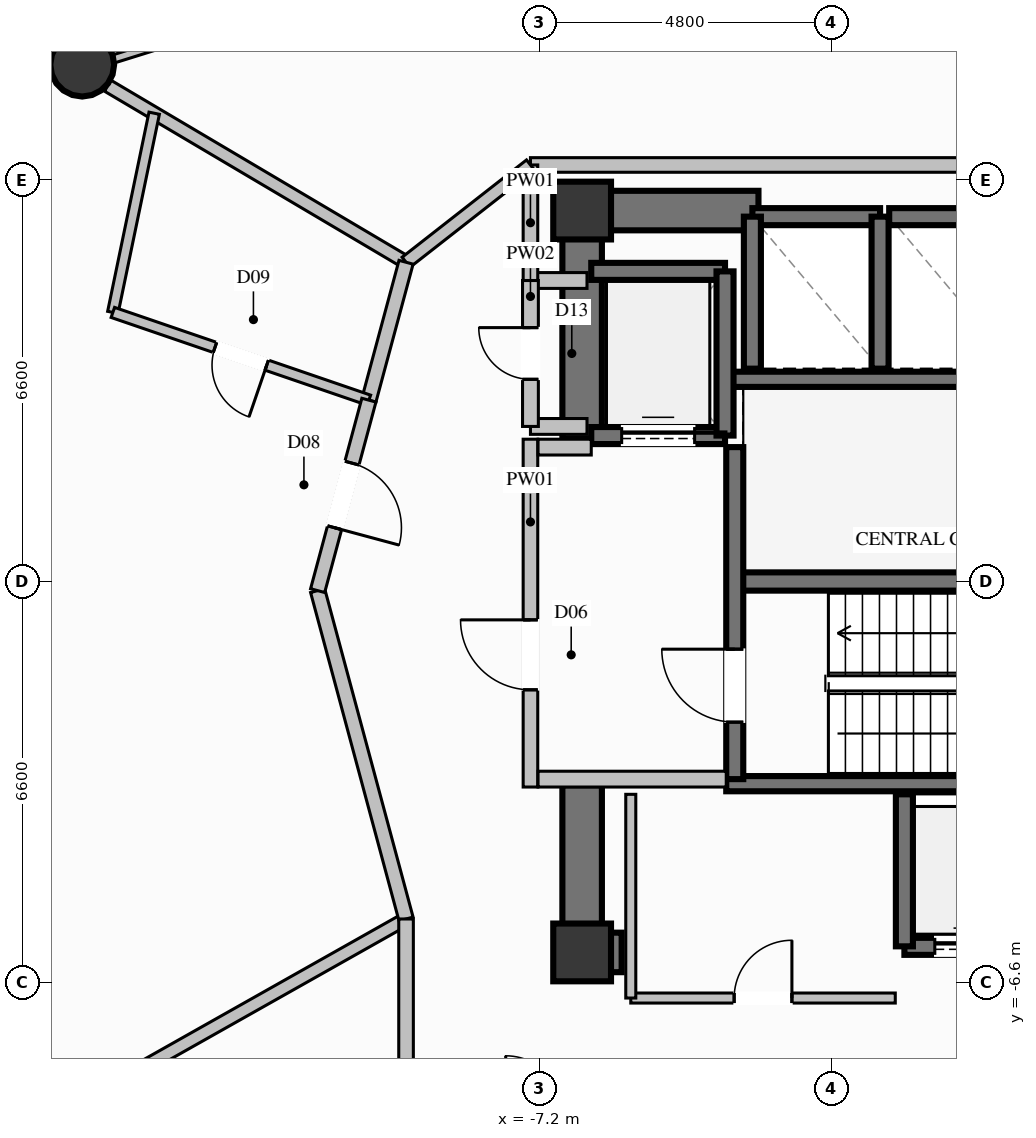
"""IFC4 building model, lengths in metres.
Left out: names, types, materials, properties, quantities, classifications, styles, units other than length and angle.
Written with IfcOpenShell. Run it as: python <this file> out.ifc"""

import sys

from ifc_helpers import new_model, si_unit, direction, frame, frame_2d, origin, origin_2d, place, context, subcontext, project, spatial, rectangle, circle, extrude, element, fill, save


model = new_model("IFC4")
c1 = context("Model", 3, precision=1e-05, world=origin(), true_north=direction((0.0, 1.0)))
c2 = subcontext(c1, "Body", "Model", "MODEL_VIEW")
j1 = project(units=[si_unit("LENGTHUNIT", "METRE"), si_unit("PLANEANGLEUNIT", "RADIAN")], contexts=[c1])
p1 = place(None, origin())
s1 = spatial("IfcSite", under=j1, at=p1, CompositionType="ELEMENT")
p2 = place(p1, origin())
s2 = spatial("IfcBuilding", under=s1, at=p2, CompositionType="ELEMENT")
p3 = place(p2, frame((0.0, 0.0, 120.6)))
s3 = spatial("IfcBuildingStorey", under=s2, at=p3, CompositionType="ELEMENT", Elevation=120.6)
for number, where, z_axis, x_axis in (
    (1, (-6.5, -6.1, 0.0), (0.0, 0.0, 1.0), (1.0, 0.0, 0.0)),
    (2, (-6.5, 6.1, 0.0), (0.0, 0.0, 1.0), (1.0, 0.0, 0.0)),
):
    element("IfcColumn", number, at=place(p3, frame(where, z_axis=z_axis, x_axis=x_axis)), inside=s3, PredefinedType="COLUMN", context=c2, shape_type="SweptSolid", body=[
        extrude(rectangle(XDim=0.95, YDim=0.95, at=origin_2d()), origin(), (0.0, 0.0, 1.0), 3.6),
    ])
p4 = place(p3, frame((-3.99, 0.0, 0.0), z_axis=(0.0, 0.0, 1.0), x_axis=(1.0, 0.0, 0.0)))
e3 = element("IfcWall", 3, at=p4, inside=s3, PredefinedType="SHEAR", context=c2, shape_type="SweptSolid", body=[
    extrude(rectangle(XDim=7.98, YDim=0.3, at=frame_2d((3.99, 0.0))), origin(), (0.0, 0.0, 1.0), 3.6),
])
for number, where, z_axis, x_axis in (
    (4, (-4.13, -3.325, 0.0), (0.0, 0.0, 1.0), (1.0, 0.0, 0.0)),
    (5, (-4.13, 3.325, 0.0), (0.0, 0.0, 1.0), (1.0, 0.0, 0.0)),
):
    element("IfcWall", number, at=place(p3, frame(where, z_axis=z_axis, x_axis=x_axis)), inside=s3, PredefinedType="SOLIDWALL", context=c2, shape_type="SweptSolid", body=[
        extrude(rectangle(XDim=8.26, YDim=0.25, at=frame_2d((4.13, 0.0))), origin(), (0.0, 0.0, 1.0), 3.6),
    ])
p5 = place(p3, frame((-6.175, -6.1, 0.0), z_axis=(0.0, 0.0, 1.0), x_axis=(1.0, 0.0, 0.0)))
e6 = element("IfcWall", 6, at=p5, inside=s3, PredefinedType="SHEAR", context=c2, shape_type="SweptSolid", body=[
    extrude(rectangle(XDim=0.325, YDim=0.65, at=frame_2d((0.163, 0.0))), origin(), (0.0, 0.0, 1.0), 3.6),
])
p6 = place(p3, frame((-6.175, 6.1, 0.0), z_axis=(0.0, 0.0, 1.0), x_axis=(1.0, 0.0, 0.0)))
e7 = element("IfcWall", 7, at=p6, inside=s3, PredefinedType="SHEAR", context=c2, shape_type="SweptSolid", body=[
    extrude(rectangle(XDim=2.575, YDim=0.65, at=frame_2d((1.288, 0.0))), origin(), (0.0, 0.0, 1.0), 3.6),
])
p7 = place(p3, frame((-6.5, 2.35, 0.0), z_axis=(0.0, 0.0, 1.0), x_axis=(0.0, 1.0, 0.0)))
e8 = element("IfcWall", 8, at=p7, inside=s3, PredefinedType="SHEAR", context=c2, shape_type="SweptSolid", body=[
    extrude(rectangle(XDim=4.075, YDim=0.65, at=frame_2d((2.038, 0.0))), origin(), (0.0, 0.0, 1.0), 3.6),
])
p8 = place(p3, frame((-6.5, -6.425, 0.0), z_axis=(0.0, 0.0, 1.0), x_axis=(0.0, 1.0, 0.0)))
e9 = element("IfcWall", 9, at=p8, inside=s3, PredefinedType="SHEAR", context=c2, shape_type="SweptSolid", body=[
    extrude(rectangle(XDim=3.075, YDim=0.65, at=frame_2d((1.538, 0.0))), origin(), (0.0, 0.0, 1.0), 3.6),
])
p9 = place(p3, frame((-14.722, 8.5, 0.0), z_axis=(0.0, 0.0, 1.0), x_axis=(1.0, 0.0, 0.0)))
e10 = element("IfcColumn", 10, at=p9, inside=s3, PredefinedType="COLUMN", context=c2, shape_type="SweptSolid", body=[
    extrude(circle(Radius=0.525, at=origin_2d()), origin(), (0.0, 0.0, 1.0), 3.6),
])
p10 = place(p3, frame((-1.2, -6.0, 0.0), z_axis=(0.0, 0.0, 1.0), x_axis=(1.0, 0.0, 0.0)))
e11 = element("IfcWall", 11, at=p10, inside=s3, PredefinedType="SOLIDWALL", context=c2, shape_type="SweptSolid", body=[
    extrude(rectangle(XDim=2.1, YDim=0.28, at=frame_2d((1.05, 0.0))), origin(), (0.0, 0.0, 1.0), 3.35),
])
p11 = place(p10, frame((0.5, 0.0, 0.0)))
e12 = element("IfcOpeningElement", 12, at=p11, cuts=e11, PredefinedType="OPENING", context=c2, shape_type="SweptSolid", body=[
    extrude(rectangle(XDim=1.1, YDim=2.2, at=frame_2d((0.55, 1.1))), frame((0.0, 0.15, 0.0), z_axis=(0.0, -1.0, 0.0), x_axis=(1.0, 0.0, 0.0)), (0.0, 0.0, 1.0), 0.3),
])
p12 = place(p3, frame((-1.2, -3.5, 0.0), z_axis=(0.0, 0.0, 1.0), x_axis=(0.0, -1.0, 0.0)))
e13 = element("IfcWall", 13, at=p12, inside=s3, PredefinedType="SOLIDWALL", context=c2, shape_type="SweptSolid", body=[
    extrude(rectangle(XDim=2.5, YDim=0.28, at=frame_2d((1.25, 0.0))), origin(), (0.0, 0.0, 1.0), 3.35),
])
p13 = place(p3, frame((-1.6, 6.0, 0.0), z_axis=(0.0, 0.0, 1.0), x_axis=(-1.0, 0.0, 0.0)))
e14 = element("IfcWall", 14, at=p13, inside=s3, PredefinedType="SOLIDWALL", context=c2, shape_type="SweptSolid", body=[
    extrude(rectangle(XDim=2.1, YDim=0.28, at=frame_2d((1.05, 0.0))), origin(), (0.0, 0.0, 1.0), 3.35),
])
for number, where, z_axis, x_axis in (
    (15, (-3.7, 6.0, 0.0), (0.0, 0.0, 1.0), (0.0, -1.0, 0.0)),
    (16, (-1.6, 3.5, 0.0), (0.0, 0.0, 1.0), (0.0, 1.0, 0.0)),
):
    element("IfcWall", number, at=place(p3, frame(where, z_axis=z_axis, x_axis=x_axis)), inside=s3, PredefinedType="SOLIDWALL", context=c2, shape_type="SweptSolid", body=[
        extrude(rectangle(XDim=2.5, YDim=0.28, at=frame_2d((1.25, 0.0))), origin(), (0.0, 0.0, 1.0), 3.35),
    ])
p14 = place(p3, frame((0.65, 6.0, 0.0), z_axis=(0.0, 0.0, 1.0), x_axis=(-1.0, 0.0, 0.0)))
e17 = element("IfcWall", 17, at=p14, inside=s3, PredefinedType="SOLIDWALL", context=c2, shape_type="SweptSolid", body=[
    extrude(rectangle(XDim=2.1, YDim=0.28, at=frame_2d((1.05, 0.0))), origin(), (0.0, 0.0, 1.0), 3.35),
])
p15 = place(p3, frame((-6.35, 2.4, 0.0), z_axis=(0.0, 0.0, 1.0), x_axis=(1.0, 0.0, 0.0)))
e18 = element("IfcWall", 18, at=p15, inside=s3, PredefinedType="SOLIDWALL", context=c2, shape_type="SweptSolid", body=[
    extrude(rectangle(XDim=2.2, YDim=0.28, at=frame_2d((1.1, 0.0))), origin(), (0.0, 0.0, 1.0), 3.35),
])
p16 = place(p15, frame((0.5, 0.0, 0.0)))
e19 = element("IfcOpeningElement", 19, at=p16, cuts=e18, PredefinedType="OPENING", context=c2, shape_type="SweptSolid", body=[
    extrude(rectangle(XDim=1.2, YDim=2.2, at=frame_2d((0.6, 1.1))), frame((0.0, 0.15, 0.0), z_axis=(0.0, -1.0, 0.0), x_axis=(1.0, 0.0, 0.0)), (0.0, 0.0, 1.0), 0.3),
])
p17 = place(p3, frame((-4.15, 5.1, 0.0), z_axis=(0.0, 0.0, 1.0), x_axis=(-1.0, 0.0, 0.0)))
e20 = element("IfcWall", 20, at=p17, inside=s3, PredefinedType="SOLIDWALL", context=c2, shape_type="SweptSolid", body=[
    extrude(rectangle(XDim=2.2, YDim=0.28, at=frame_2d((1.1, 0.0))), origin(), (0.0, 0.0, 1.0), 3.35),
])
p18 = place(p3, frame((-4.15, 2.4, 0.0), z_axis=(0.0, 0.0, 1.0), x_axis=(0.0, 1.0, 0.0)))
e21 = element("IfcWall", 21, at=p18, inside=s3, PredefinedType="SOLIDWALL", context=c2, shape_type="SweptSolid", body=[
    extrude(rectangle(XDim=2.7, YDim=0.28, at=frame_2d((1.35, 0.0))), origin(), (0.0, 0.0, 1.0), 3.35),
])
p19 = place(p3, frame((-3.99, -3.25, 0.0), z_axis=(0.0, 0.0, 1.0), x_axis=(0.0, 1.0, 0.0)))
e22 = element("IfcWall", 22, at=p19, inside=s3, PredefinedType="SOLIDWALL", context=c2, shape_type="SweptSolid", body=[
    extrude(rectangle(XDim=5.46, YDim=0.28, at=frame_2d((2.73, 0.0))), origin(), (0.0, 0.0, 1.0), 3.35),
])
p20 = place(p19, frame((0.937, 0.0, 0.0)))
e23 = element("IfcOpeningElement", 23, at=p20, cuts=e22, PredefinedType="OPENING", context=c2, shape_type="SweptSolid", body=[
    extrude(rectangle(XDim=1.2, YDim=2.2, at=frame_2d((0.6, 1.1))), frame((0.0, 0.15, 0.0), z_axis=(0.0, -1.0, 0.0), x_axis=(1.0, 0.0, 0.0)), (0.0, 0.0, 1.0), 0.3),
])
p21 = place(p3, frame((-7.35, -3.38, 0.0), z_axis=(0.0, 0.0, 1.0), x_axis=(0.0, 1.0, 0.0)))
e24 = element("IfcWall", 24, at=p21, inside=s3, PredefinedType="PARTITIONING", context=c2, shape_type="SweptSolid", body=[
    extrude(rectangle(XDim=5.72, YDim=0.24, at=frame_2d((2.86, 0.0))), origin(), (0.0, 0.0, 1.0), 2.435),
])
p22 = place(p21, frame((1.599, 0.0, 0.0)))
e25 = element("IfcOpeningElement", 25, at=p22, cuts=e24, PredefinedType="OPENING", context=c2, shape_type="SweptSolid", body=[
    extrude(rectangle(XDim=1.15, YDim=2.2, at=frame_2d((0.575, 1.1))), frame((0.0, 0.13, 0.0), z_axis=(0.0, -1.0, 0.0), x_axis=(1.0, 0.0, 0.0)), (0.0, 0.0, 1.0), 0.26),
])
p23 = place(p3, frame((-7.225, -3.25, 0.0), z_axis=(0.0, 0.0, 1.0), x_axis=(1.0, 0.0, 0.0)))
e26 = element("IfcWall", 26, at=p23, inside=s3, PredefinedType="PARTITIONING", context=c2, shape_type="SweptSolid", body=[
    extrude(rectangle(XDim=3.095, YDim=0.26, at=frame_2d((1.548, 0.0))), origin(), (0.0, 0.0, 1.0), 3.35),
])
p24 = place(p3, frame((-7.225, 2.21, 0.0), z_axis=(0.0, 0.0, 1.0), x_axis=(1.0, 0.0, 0.0)))
e27 = element("IfcWall", 27, at=p24, inside=s3, PredefinedType="PARTITIONING", context=c2, shape_type="SweptSolid", body=[
    extrude(rectangle(XDim=0.875, YDim=0.26, at=frame_2d((0.438, 0.0))), origin(), (0.0, 0.0, 1.0), 3.35),
])
for number, where, z_axis, x_axis in (
    (28, (-7.35, 4.95, 0.0), (0.0, 0.0, 1.0), (1.0, 0.0, 0.0)),
    (29, (-7.35, 2.55, 0.0), (0.0, 0.0, 1.0), (1.0, 0.0, 0.0)),
):
    element("IfcWall", number, at=place(p3, frame(where, z_axis=z_axis, x_axis=x_axis)), inside=s3, PredefinedType="PARTITIONING", context=c2, shape_type="SweptSolid", body=[
        extrude(rectangle(XDim=0.93, YDim=0.26, at=frame_2d((0.465, 0.0))), origin(), (0.0, 0.0, 1.0), 3.35),
    ])
p25 = place(p3, frame((-7.35, 2.55, 0.0), z_axis=(0.0, 0.0, 1.0), x_axis=(0.0, 1.0, 0.0)))
e30 = element("IfcWall", 30, at=p25, inside=s3, PredefinedType="PARTITIONING", context=c2, shape_type="SweptSolid", body=[
    extrude(rectangle(XDim=2.4, YDim=0.26, at=frame_2d((1.2, 0.0))), origin(), (0.0, 0.0, 1.0), 2.435),
])
p26 = place(p25, frame((0.775, 0.0, 0.0)))
e31 = element("IfcOpeningElement", 31, at=p26, cuts=e30, PredefinedType="OPENING", context=c2, shape_type="SweptSolid", body=[
    extrude(rectangle(XDim=0.85, YDim=2.05, at=frame_2d((0.425, 1.025))), frame((0.0, 0.14, 0.0), z_axis=(0.0, -1.0, 0.0), x_axis=(1.0, 0.0, 0.0)), (0.0, 0.0, 1.0), 0.28),
])
p27 = place(p3, frame((-7.35, 6.85, 0.0), z_axis=(0.0, 0.0, 1.0), x_axis=(1.0, 0.0, 0.0)))
e32 = element("IfcWall", 32, at=p27, inside=s3, PredefinedType="PARTITIONING", context=c2, shape_type="SweptSolid", body=[
    extrude(rectangle(XDim=14.7, YDim=0.24, at=frame_2d((7.35, 0.0))), origin(), (0.0, 0.0, 1.0), 2.435),
])
p28 = place(p3, frame((-7.35, 4.95, 0.0), z_axis=(0.0, 0.0, 1.0), x_axis=(0.0, 1.0, 0.0)))
e33 = element("IfcWall", 33, at=p28, inside=s3, PredefinedType="PARTITIONING", context=c2, shape_type="SweptSolid", body=[
    extrude(rectangle(XDim=1.9, YDim=0.24, at=frame_2d((0.95, 0.0))), origin(), (0.0, 0.0, 1.0), 2.435),
])
p29 = place(p3, frame((-5.7, -6.85, 0.0), z_axis=(0.0, 0.0, 1.0), x_axis=(1.0, 0.0, 0.0)))
e34 = element("IfcWall", 34, at=p29, inside=s3, PredefinedType="PARTITIONING", context=c2, shape_type="SweptSolid", body=[
    extrude(rectangle(XDim=4.35, YDim=0.165, at=frame_2d((2.175, 0.0))), origin(), (0.0, 0.0, 1.0), 2.435),
])
p30 = place(p29, frame((1.7, 0.0, 0.0)))
e35 = element("IfcOpeningElement", 35, at=p30, cuts=e34, PredefinedType="OPENING", context=c2, shape_type="SweptSolid", body=[
    extrude(rectangle(XDim=0.95, YDim=2.1, at=frame_2d((0.475, 1.05))), frame((0.0, 0.093, 0.0), z_axis=(0.0, -1.0, 0.0), x_axis=(1.0, 0.0, 0.0)), (0.0, 0.0, 1.0), 0.185),
])
p31 = place(p3, frame((-5.7, -3.5, 0.0), z_axis=(0.0, 0.0, 1.0), x_axis=(0.0, -1.0, 0.0)))
e36 = element("IfcWall", 36, at=p31, inside=s3, PredefinedType="PARTITIONING", context=c2, shape_type="SweptSolid", body=[
    extrude(rectangle(XDim=3.35, YDim=0.165, at=frame_2d((1.675, 0.0))), origin(), (0.0, 0.0, 1.0), 2.435),
])
p32 = place(p3, frame((-9.396, 5.25, 0.0), z_axis=(0.0, 0.0, 1.0), x_axis=(-0.860613457584, 0.509258752134, 0.0)))
e37 = element("IfcWall", 37, at=p32, inside=s3, PredefinedType="PARTITIONING", context=c2, shape_type="SweptSolid", body=[
    extrude(rectangle(XDim=5.701, YDim=0.21, at=frame_2d((2.85, 0.0))), origin(), (0.0, 0.0, 1.0), 2.719),
])
p33 = place(p3, frame((-15.228, 8.701, 0.0), z_axis=(0.0, 0.0, 1.0), x_axis=(-0.860620773238, 0.509246388962, 0.0)))
e38 = element("IfcWall", 38, at=p33, inside=s3, PredefinedType="PARTITIONING", context=c2, shape_type="SweptSolid", body=[
    extrude(rectangle(XDim=7.38, YDim=0.21, at=frame_2d((3.69, 0.0))), origin(), (0.0, 0.0, 1.0), 3.35),
])
p34 = place(p3, frame((-9.396, -5.55, 0.0), z_axis=(0.0, 0.0, 1.0), x_axis=(-0.871038847926, -0.491214133962, 0.0)))
e39 = element("IfcWall", 39, at=p34, inside=s3, PredefinedType="PARTITIONING", context=c2, shape_type="SweptSolid", body=[
    extrude(rectangle(XDim=5.545, YDim=0.21, at=frame_2d((2.772, 0.0))), origin(), (0.0, 0.0, 1.0), 2.719),
])
p35 = place(p3, frame((-9.396, 5.25, 0.0), z_axis=(0.0, 0.0, 1.0), x_axis=(0.7876993483, 0.6160598483, 0.0)))
e40 = element("IfcWall", 40, at=p35, inside=s3, PredefinedType="PARTITIONING", context=c2, shape_type="SweptSolid", body=[
    extrude(rectangle(XDim=2.597, YDim=0.21, at=frame_2d((1.299, 0.0))), origin(), (0.0, 0.0, 1.0), 3.35),
])
p36 = place(p3, frame((-14.757, 8.422, 0.0), z_axis=(0.0, 0.0, 1.0), x_axis=(0.954677897028, 0.297640912722, 0.0)))
e41 = element("IfcWall", 41, at=p36, inside=s3, PredefinedType="PARTITIONING", context=c2, shape_type="SweptSolid", body=[
    extrude(rectangle(XDim=15.458, YDim=0.135, at=frame_2d((7.729, 0.0))), origin(), (0.0, 0.0, 1.0), 2.878),
])
p37 = place(p36, frame((7.254, 0.0, 0.0)))
e42 = element("IfcOpeningElement", 42, at=p37, cuts=e41, PredefinedType="OPENING", context=c2, shape_type="SweptSolid", body=[
    extrude(rectangle(XDim=0.95, YDim=2.1, at=frame_2d((0.475, 1.05))), frame((0.0, 0.078, 0.0), z_axis=(0.0, -1.0, 0.0), x_axis=(1.0, 0.0, 0.0)), (0.0, 0.0, 1.0), 0.155),
])
p38 = place(p3, frame((-9.396, 5.25, 0.0), z_axis=(0.0, 0.0, 1.0), x_axis=(-0.260152382661, -0.965567572879, 0.0)))
e43 = element("IfcWall", 43, at=p38, inside=s3, PredefinedType="PARTITIONING", context=c2, shape_type="SweptSolid", body=[
    extrude(rectangle(XDim=2.349, YDim=0.24, at=frame_2d((1.174, 0.0))), origin(), (0.0, 0.0, 1.0), 3.35),
])
p39 = place(p3, frame((-13.538, 7.701, 0.0), z_axis=(0.0, 0.0, 1.0), x_axis=(-0.203225696563, -0.979131919741, 0.0)))
e44 = element("IfcWall", 44, at=p39, inside=s3, PredefinedType="PLUMBINGWALL", context=c2, shape_type="SweptSolid", body=[
    extrude(rectangle(XDim=3.346, YDim=0.175, at=frame_2d((1.673, 0.0))), origin(), (0.0, 0.0, 1.0), 3.35),
])
p40 = place(p3, frame((-10.007, 2.982, 0.0), z_axis=(0.0, 0.0, 1.0), x_axis=(-0.945989686211, 0.3241967205, 0.0)))
e45 = element("IfcWall", 45, at=p40, inside=s3, PredefinedType="PLUMBINGWALL", context=c2, shape_type="SweptSolid", body=[
    extrude(rectangle(XDim=4.451, YDim=0.175, at=frame_2d((2.226, 0.0))), origin(), (0.0, 0.0, 1.0), 3.35),
])
p41 = place(p40, frame((1.776, 0.0, 0.0)))
e46 = element("IfcOpeningElement", 46, at=p41, cuts=e45, PredefinedType="OPENING", context=c2, shape_type="SweptSolid", body=[
    extrude(rectangle(XDim=0.9, YDim=2.1, at=frame_2d((0.45, 1.05))), frame((0.0, 0.098, 0.0), z_axis=(0.0, -1.0, 0.0), x_axis=(1.0, 0.0, 0.0)), (0.0, 0.0, 1.0), 0.195),
])
p42 = place(p3, frame((-10.85, -0.15, 0.0), z_axis=(0.0, 0.0, 1.0), x_axis=(0.260009481157, -0.965606063417, 0.0)))
e47 = element("IfcWall", 47, at=p42, inside=s3, PredefinedType="PARTITIONING", context=c2, shape_type="SweptSolid", body=[
    extrude(rectangle(XDim=5.593, YDim=0.24, at=frame_2d((2.796, 0.0))), origin(), (0.0, 0.0, 1.0), 3.35),
])
p43 = place(p3, frame((-10.007, 2.982, 0.0), z_axis=(0.0, 0.0, 1.0), x_axis=(-0.259924881751, -0.965628839589, 0.0)))
e48 = element("IfcWall", 48, at=p43, inside=s3, PredefinedType="PARTITIONING", context=c2, shape_type="SweptSolid", body=[
    extrude(rectangle(XDim=3.243, YDim=0.24, at=frame_2d((1.622, 0.0))), origin(), (0.0, 0.0, 1.0), 3.35),
])
p44 = place(p43, frame((1.072, 0.0, 0.0)))
e49 = element("IfcOpeningElement", 49, at=p44, cuts=e48, PredefinedType="OPENING", context=c2, shape_type="SweptSolid", body=[
    extrude(rectangle(XDim=1.1, YDim=2.3, at=frame_2d((0.55, 1.15))), frame((0.0, 0.13, 0.0), z_axis=(0.0, -1.0, 0.0), x_axis=(1.0, 0.0, 0.0)), (0.0, 0.0, 1.0), 0.26),
])
p45 = place(p3, frame((-9.396, -5.55, 0.0), z_axis=(0.0, 0.0, 1.0), x_axis=(0.0, -1.0, 0.0)))
e50 = element("IfcWall", 50, at=p45, inside=s3, PredefinedType="PARTITIONING", context=c2, shape_type="SweptSolid", body=[
    extrude(rectangle(XDim=3.2, YDim=0.24, at=frame_2d((1.6, 0.0))), origin(), (0.0, 0.0, 1.0), 3.35),
])
p46 = place(p11, origin())
e51 = element("IfcDoor", 51, at=p46, inside=s3, OperationType="SLIDING_TO_LEFT", PredefinedType="DOOR", context=c2, shape_type="SweptSolid", body=[
    extrude(rectangle(XDim=1.1, YDim=2.2, at=frame_2d((0.55, 1.1))), frame((0.0, 0.025, 0.0), z_axis=(0.0, -1.0, 0.0), x_axis=(1.0, 0.0, 0.0)), (0.0, 0.0, 1.0), 0.05),
])
fill(e12, e51)
p47 = place(p16, origin())
e52 = element("IfcDoor", 52, at=p47, inside=s3, OperationType="SLIDING_TO_LEFT", PredefinedType="DOOR", context=c2, shape_type="SweptSolid", body=[
    extrude(rectangle(XDim=1.2, YDim=2.2, at=frame_2d((0.6, 1.1))), frame((0.0, 0.025, 0.0), z_axis=(0.0, -1.0, 0.0), x_axis=(1.0, 0.0, 0.0)), (0.0, 0.0, 1.0), 0.05),
])
fill(e19, e52)
p48 = place(p20, origin())
e53 = element("IfcDoor", 53, at=p48, inside=s3, OperationType="SINGLE_SWING_RIGHT", PredefinedType="DOOR", context=c2, shape_type="SweptSolid", body=[
    extrude(rectangle(XDim=1.2, YDim=2.2, at=frame_2d((0.6, 1.1))), frame((0.0, 0.025, 0.0), z_axis=(0.0, -1.0, 0.0), x_axis=(1.0, 0.0, 0.0)), (0.0, 0.0, 1.0), 0.05),
])
fill(e23, e53)
p49 = place(p22, origin())
e54 = element("IfcDoor", 54, at=p49, inside=s3, OperationType="SINGLE_SWING_RIGHT", PredefinedType="DOOR", context=c2, shape_type="SweptSolid", body=[
    extrude(rectangle(XDim=1.15, YDim=2.2, at=frame_2d((0.575, 1.1))), frame((0.0, 0.025, 0.0), z_axis=(0.0, -1.0, 0.0), x_axis=(1.0, 0.0, 0.0)), (0.0, 0.0, 1.0), 0.05),
])
fill(e25, e54)
p50 = place(p26, origin())
e55 = element("IfcDoor", 55, at=p50, inside=s3, OperationType="SINGLE_SWING_RIGHT", PredefinedType="DOOR", context=c2, shape_type="SweptSolid", body=[
    extrude(rectangle(XDim=0.85, YDim=2.05, at=frame_2d((0.425, 1.025))), frame((0.0, 0.025, 0.0), z_axis=(0.0, -1.0, 0.0), x_axis=(1.0, 0.0, 0.0)), (0.0, 0.0, 1.0), 0.05),
])
fill(e31, e55)
p51 = place(p30, origin())
e56 = element("IfcDoor", 56, at=p51, inside=s3, OperationType="SINGLE_SWING_RIGHT", PredefinedType="DOOR", context=c2, shape_type="SweptSolid", body=[
    extrude(rectangle(XDim=0.95, YDim=2.1, at=frame_2d((0.475, 1.05))), frame((0.0, 0.025, 0.0), z_axis=(0.0, -1.0, 0.0), x_axis=(1.0, 0.0, 0.0)), (0.0, 0.0, 1.0), 0.05),
])
fill(e35, e56)
p52 = place(p41, origin())
e57 = element("IfcDoor", 57, at=p52, inside=s3, OperationType="SINGLE_SWING_LEFT", PredefinedType="DOOR", context=c2, shape_type="SweptSolid", body=[
    extrude(rectangle(XDim=0.9, YDim=2.1, at=frame_2d((0.45, 1.05))), frame((0.0, 0.025, 0.0), z_axis=(0.0, -1.0, 0.0), x_axis=(1.0, 0.0, 0.0)), (0.0, 0.0, 1.0), 0.05),
])
fill(e46, e57)
p53 = place(p44, origin())
e58 = element("IfcDoor", 58, at=p53, inside=s3, OperationType="SINGLE_SWING_RIGHT", PredefinedType="DOOR", context=c2, shape_type="SweptSolid", body=[
    extrude(rectangle(XDim=1.1, YDim=2.3, at=frame_2d((0.55, 1.15))), frame((0.0, 0.025, 0.0), z_axis=(0.0, -1.0, 0.0), x_axis=(1.0, 0.0, 0.0)), (0.0, 0.0, 1.0), 0.05),
])
fill(e49, e58)
save(model, sys.argv[1])
